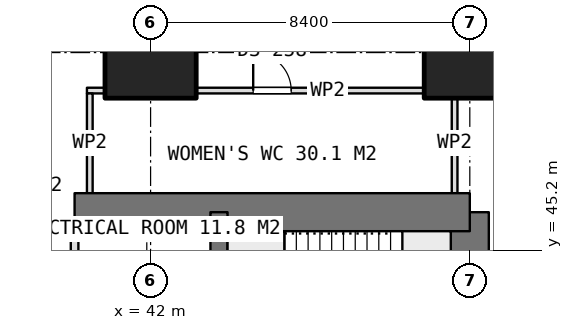
"""IFC4 building model, lengths in metres.
Left out: names, types, materials, properties, quantities, classifications, styles, units other than length and angle.
Written with IfcOpenShell. Run it as: python <this file> out.ifc"""

import sys

from ifc_helpers import new_model, si_unit, direction, frame, frame_2d, origin, origin_2d, place, context, subcontext, project, spatial, rectangle, extrude, element, fill, save


model = new_model("IFC4")
c1 = context("Model", 3, precision=1e-05, world=origin(), true_north=direction((0.0, 1.0)))
c2 = subcontext(c1, "Body", "Model", "MODEL_VIEW")
j1 = project(units=[si_unit("LENGTHUNIT", "METRE"), si_unit("PLANEANGLEUNIT", "RADIAN")], contexts=[c1])
p1 = place(None, origin())
s1 = spatial("IfcSite", under=j1, at=p1, CompositionType="ELEMENT")
p2 = place(p1, origin())
s2 = spatial("IfcBuilding", under=s1, at=p2, CompositionType="ELEMENT")
p3 = place(p2, frame((0.0, 0.0, 236.45)))
s3 = spatial("IfcBuildingStorey", under=s2, at=p3, CompositionType="ELEMENT", Elevation=236.45)
p4 = place(p3, frame((40.0, 46.2, 0.0), z_axis=(0.0, 0.0, 1.0), x_axis=(1.0, 0.0, 0.0)))
e1 = element("IfcWall", 1, at=p4, inside=s3, PredefinedType="SHEAR", context=c2, shape_type="SweptSolid", body=[
    extrude(rectangle(XDim=10.4, YDim=1.0, at=frame_2d((5.2, 0.0))), origin(), (0.0, 0.0, 1.0), 3.75),
])
p5 = place(p3, frame((50.4, 21.0, 0.0), z_axis=(0.0, 0.0, 1.0), x_axis=(0.0, 1.0, 0.0)))
e2 = element("IfcWall", 2, at=p5, inside=s3, PredefinedType="SHEAR", context=c2, shape_type="SweptSolid", body=[
    extrude(rectangle(XDim=25.2, YDim=1.0, at=frame_2d((12.6, 0.0))), origin(), (0.0, 0.0, 1.0), 3.75),
])
p6 = place(p5, frame((16.2, 0.0, 0.0)))
e3 = element("IfcOpeningElement", 3, at=p6, cuts=e2, PredefinedType="OPENING", context=c2, shape_type="SweptSolid", body=[
    extrude(rectangle(XDim=1.2, YDim=2.1, at=frame_2d((0.6, 1.05))), frame((0.0, 0.51, 0.0), z_axis=(0.0, -1.0, 0.0), x_axis=(1.0, 0.0, 0.0)), (0.0, 0.0, 1.0), 1.02),
])
p7 = place(p5, frame((10.05, 0.0, 0.0)))
e4 = element("IfcOpeningElement", 4, at=p7, cuts=e2, PredefinedType="OPENING", context=c2, shape_type="SweptSolid", body=[
    extrude(rectangle(XDim=0.9, YDim=2.1, at=frame_2d((0.45, 1.05))), frame((0.0, 0.51, 0.0), z_axis=(0.0, -1.0, 0.0), x_axis=(1.0, 0.0, 0.0)), (0.0, 0.0, 1.0), 1.02),
])
p8 = place(p5, frame((7.45, 0.0, 0.0)))
e5 = element("IfcOpeningElement", 5, at=p8, cuts=e2, PredefinedType="OPENING", context=c2, shape_type="SweptSolid", body=[
    extrude(rectangle(XDim=0.9, YDim=2.1, at=frame_2d((0.45, 1.05))), frame((0.0, 0.51, 0.0), z_axis=(0.0, -1.0, 0.0), x_axis=(1.0, 0.0, 0.0)), (0.0, 0.0, 1.0), 1.02),
])
p9 = place(p5, frame((0.7, 0.0, 0.0)))
e6 = element("IfcOpeningElement", 6, at=p9, cuts=e2, PredefinedType="OPENING", context=c2, shape_type="SweptSolid", body=[
    extrude(rectangle(XDim=1.2, YDim=2.1, at=frame_2d((0.6, 1.05))), frame((0.0, 0.51, 0.0), z_axis=(0.0, -1.0, 0.0), x_axis=(1.0, 0.0, 0.0)), (0.0, 0.0, 1.0), 1.02),
])
p10 = place(p3, frame((43.8, 21.0, 0.0), z_axis=(0.0, 0.0, 1.0), x_axis=(0.0, 1.0, 0.0)))
e7 = element("IfcWall", 7, at=p10, inside=s3, PredefinedType="SHEAR", context=c2, shape_type="SweptSolid", body=[
    extrude(rectangle(XDim=25.2, YDim=0.45, at=frame_2d((12.6, 0.0))), origin(), (0.0, 0.0, 1.0), 3.75),
])
for number, where, z_axis, x_axis in (
    (8, (42.0, 50.4, 0.0), (0.0, 0.0, 1.0), (1.0, 0.0, 0.0)),
    (9, (50.4, 50.4, 0.0), (0.0, 0.0, 1.0), (1.0, 0.0, 0.0)),
):
    element("IfcColumn", number, at=place(p3, frame(where, z_axis=z_axis, x_axis=x_axis)), inside=s3, PredefinedType="COLUMN", context=c2, shape_type="SweptSolid", body=[
        extrude(rectangle(XDim=2.4, YDim=2.4, at=origin_2d()), origin(), (0.0, 0.0, 1.0), 3.75),
    ])
p11 = place(p3, frame((40.0, 41.625, 0.0), z_axis=(0.0, 0.0, 1.0), x_axis=(0.0, 1.0, 0.0)))
e10 = element("IfcWall", 10, at=p11, inside=s3, PredefinedType="PARTITIONING", context=c2, shape_type="SweptSolid", body=[
    extrude(rectangle(XDim=4.075, YDim=0.2, at=frame_2d((2.038, 0.0))), origin(), (0.0, 0.0, 1.0), 3.4),
])
p12 = place(p11, frame((2.575, 0.0, 0.0)))
e11 = element("IfcOpeningElement", 11, at=p12, cuts=e10, PredefinedType="OPENING", context=c2, shape_type="SweptSolid", body=[
    extrude(rectangle(XDim=0.9, YDim=2.1, at=frame_2d((0.45, 1.05))), frame((0.0, 0.11, 0.0), z_axis=(0.0, -1.0, 0.0), x_axis=(1.0, 0.0, 0.0)), (0.0, 0.0, 1.0), 0.22),
])
p13 = place(p11, frame((0.175, 0.0, 0.0)))
e12 = element("IfcOpeningElement", 12, at=p13, cuts=e10, PredefinedType="OPENING", context=c2, shape_type="SweptSolid", body=[
    extrude(rectangle(XDim=0.9, YDim=2.1, at=frame_2d((0.45, 1.05))), frame((0.0, 0.11, 0.0), z_axis=(0.0, -1.0, 0.0), x_axis=(1.0, 0.0, 0.0)), (0.0, 0.0, 1.0), 0.22),
])
p14 = place(p3, frame((40.325, 49.4, 0.0), z_axis=(0.0, 0.0, 1.0), x_axis=(1.0, 0.0, 0.0)))
e13 = element("IfcWall", 13, at=p14, inside=s3, PredefinedType="PARTITIONING", context=c2, shape_type="SweptSolid", body=[
    extrude(rectangle(XDim=9.75, YDim=0.15, at=frame_2d((4.875, 0.0))), origin(), (0.0, 0.0, 1.0), 3.4),
])
p15 = place(p14, frame((4.375, 0.0, 0.0)))
e14 = element("IfcOpeningElement", 14, at=p15, cuts=e13, PredefinedType="OPENING", context=c2, shape_type="SweptSolid", body=[
    extrude(rectangle(XDim=1.0, YDim=2.1, at=frame_2d((0.5, 1.05))), frame((0.0, 0.085, 0.0), z_axis=(0.0, -1.0, 0.0), x_axis=(1.0, 0.0, 0.0)), (0.0, 0.0, 1.0), 0.17),
])
for number, where, z_axis, x_axis in (
    (15, (40.4, 46.7, 0.0), (0.0, 0.0, 1.0), (0.0, 1.0, 0.0)),
    (16, (50.0, 46.7, 0.0), (0.0, 0.0, 1.0), (0.0, 1.0, 0.0)),
):
    element("IfcWall", number, at=place(p3, frame(where, z_axis=z_axis, x_axis=x_axis)), inside=s3, PredefinedType="PARTITIONING", context=c2, shape_type="SweptSolid", body=[
        extrude(rectangle(XDim=2.625, YDim=0.15, at=frame_2d((1.312, 0.0))), origin(), (0.0, 0.0, 1.0), 3.4),
    ])
p16 = place(p15, origin())
e17 = element("IfcDoor", 17, at=p16, inside=s3, OperationType="SINGLE_SWING_LEFT", PredefinedType="DOOR", context=c2, shape_type="SweptSolid", body=[
    extrude(rectangle(XDim=1.0, YDim=2.1, at=frame_2d((0.5, 1.05))), frame((0.0, 0.025, 0.0), z_axis=(0.0, -1.0, 0.0), x_axis=(1.0, 0.0, 0.0)), (0.0, 0.0, 1.0), 0.05),
])
fill(e14, e17)
save(model, sys.argv[1])
